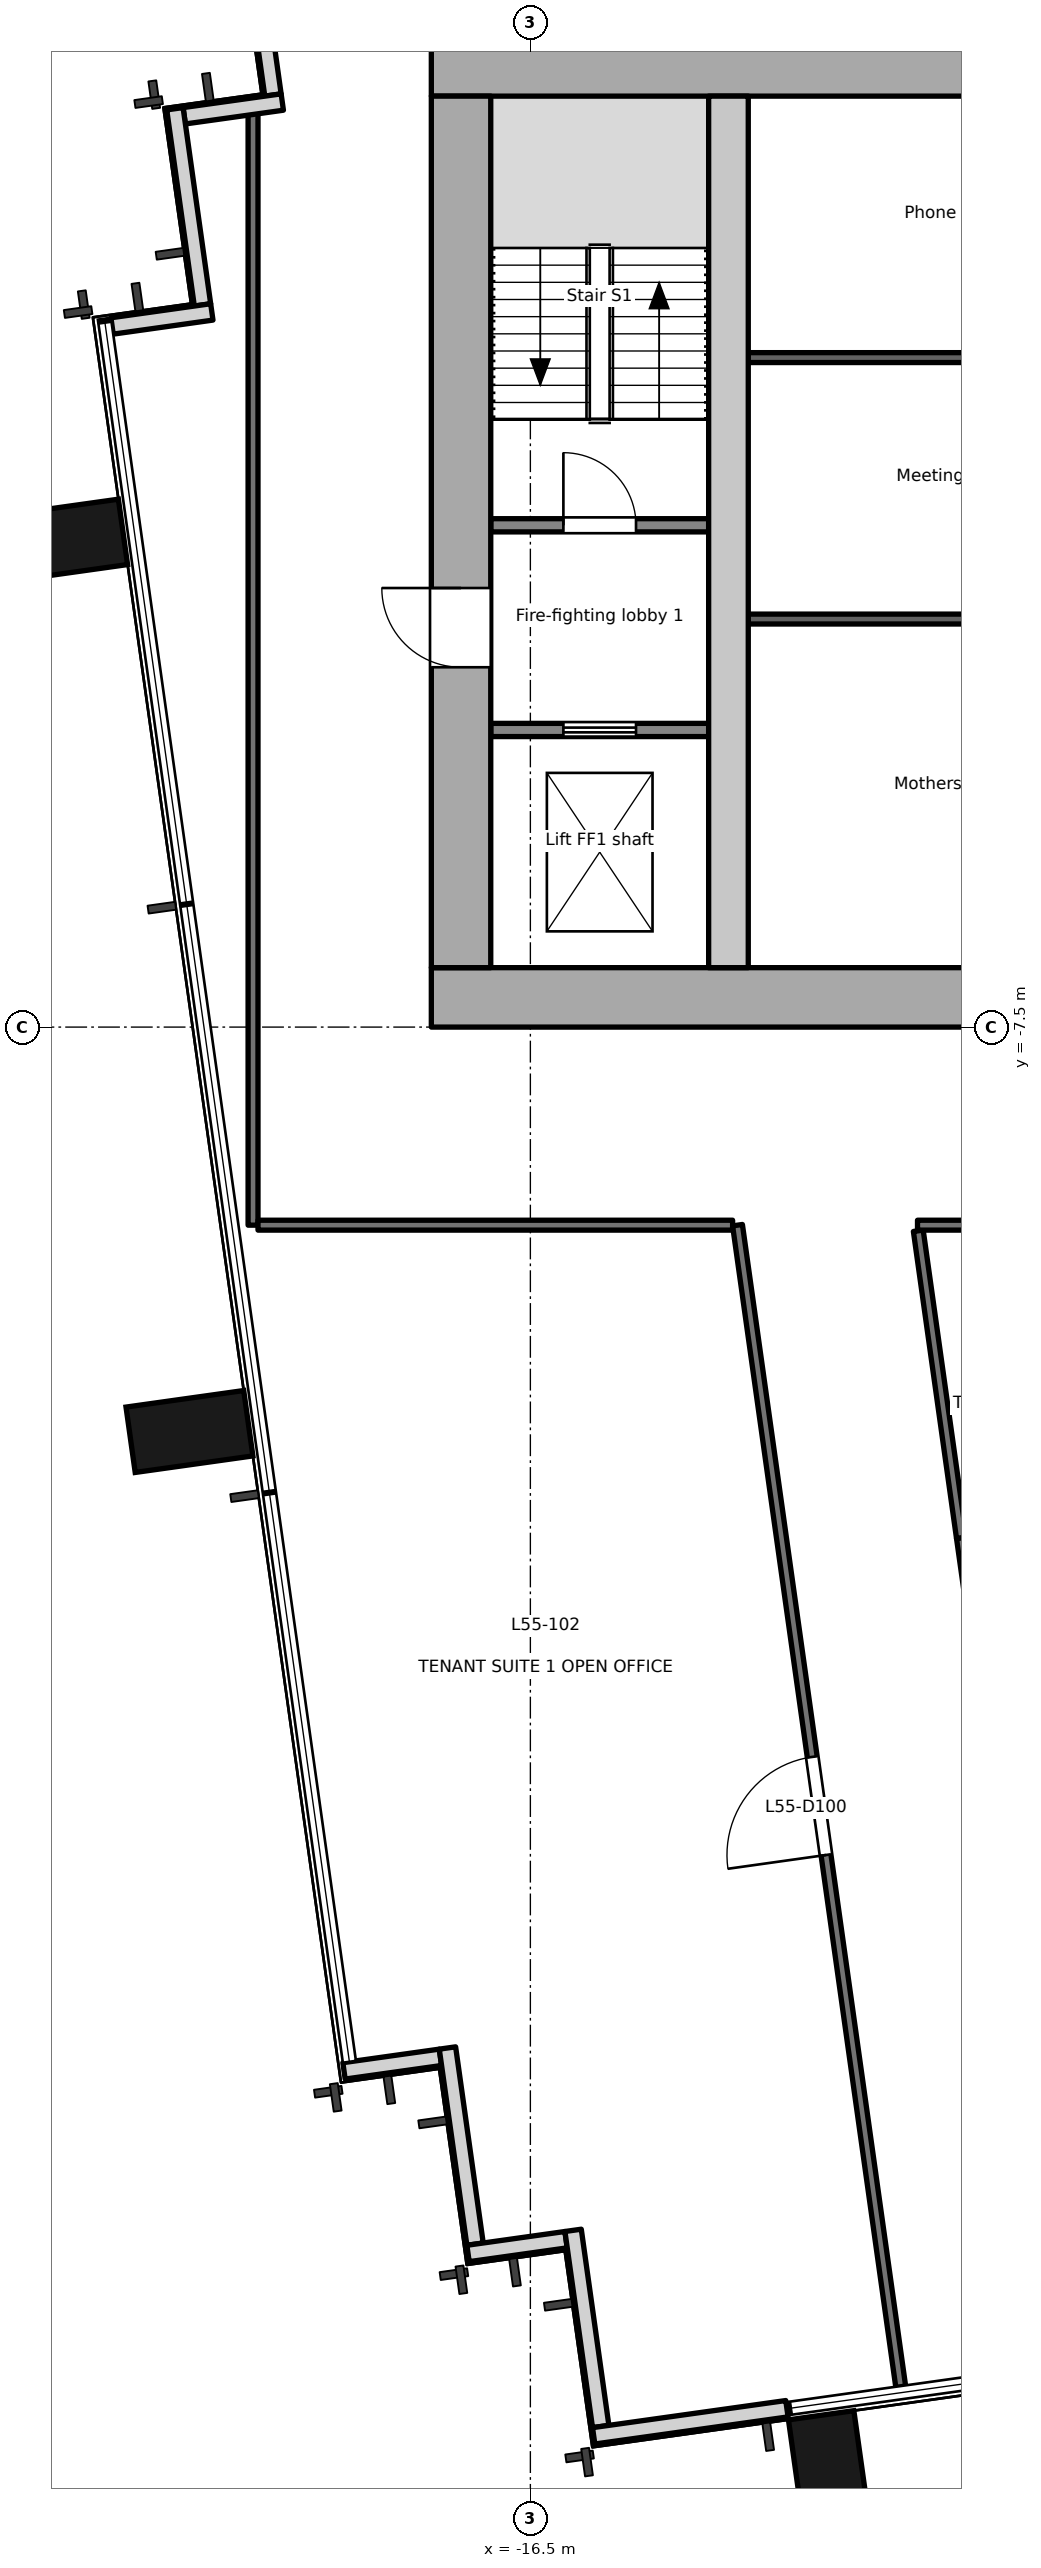
"""IFC4 building model, lengths in metres.
Left out: names, types, materials, properties, quantities, classifications, styles, units other than length and angle.
Written with IfcOpenShell. Run it as: python <this file> out.ifc"""

import sys

from ifc_helpers import new_model, si_unit, direction, frame, frame_2d, origin, origin_2d, place, context, subcontext, project, spatial, rectangle, extrude, element, fill, save


model = new_model("IFC4")
c1 = context("Model", 3, precision=1e-05, world=origin(), true_north=direction((0.0, 1.0)))
c2 = subcontext(c1, "Body", "Model", "MODEL_VIEW")
j1 = project(units=[si_unit("LENGTHUNIT", "METRE"), si_unit("PLANEANGLEUNIT", "RADIAN")], contexts=[c1])
p1 = place(None, origin())
s1 = spatial("IfcSite", under=j1, at=p1, CompositionType="ELEMENT")
p2 = place(p1, origin())
s2 = spatial("IfcBuilding", under=s1, at=p2, CompositionType="ELEMENT")
p3 = place(p2, frame((0.0, 0.0, 240.8)))
s3 = spatial("IfcBuildingStorey", under=s2, at=p3, CompositionType="ELEMENT", Elevation=240.8)
for number, where, z_axis, x_axis in (
    (1, (-11.971, -29.416, -0.2), (0.0, 0.0, 1.0), (0.99, 0.139, 0.0)),
    (2, (-21.663, -13.625, -0.2), (0.0, 0.0, 1.0), (-0.139, 0.99, 0.0)),
    (3, (-23.561, -0.125, -0.2), (0.0, 0.0, 1.0), (-0.139, 0.99, 0.0)),
):
    element("IfcColumn", number, at=place(p3, frame(where, z_axis=z_axis, x_axis=x_axis)), inside=s3, PredefinedType="COLUMN", context=c2, shape_type="SweptSolid", body=[
        extrude(rectangle(XDim=1.0, YDim=1.8, at=origin_2d()), origin(), (0.0, 0.0, 1.0), 3.9),
    ])
p4 = place(p3, frame((-20.815, 9.588, 0.0), z_axis=(0.0, 0.0, 1.0), x_axis=(0.138983028379, -0.9902947631, 0.0)))
e4 = element("IfcWall", 4, at=p4, inside=s3, PredefinedType="SOLIDWALL", context=c2, shape_type="SweptSolid", body=[
    extrude(rectangle(XDim=3.0, YDim=0.25, at=frame_2d((1.5, 0.0))), origin(), (0.0, 0.0, 1.0), 3.7),
])
p5 = place(p3, frame((-20.257, 6.51, 0.0), z_axis=(0.0, 0.0, 1.0), x_axis=(-0.990330117064, -0.138730887823, 0.0)))
e5 = element("IfcWall", 5, at=p5, inside=s3, PredefinedType="SOLIDWALL", context=c2, shape_type="SweptSolid", body=[
    extrude(rectangle(XDim=1.499, YDim=0.25, at=frame_2d((0.75, 0.0))), origin(), (0.0, 0.0, 1.0), 3.7),
])
p6 = place(p3, frame((-21.883, 6.409, 0.0), z_axis=(0.0, 0.0, 1.0), x_axis=(0.139324658755, -0.990246756855, 0.0)))
e6 = element("IfcWall", 6, at=p6, inside=s3, PredefinedType="SOLIDWALL", context=c2, shape_type="SweptSolid", body=[
    extrude(rectangle(XDim=3.0, YDim=0.25, at=frame_2d((1.5, 0.0))), origin(), (0.0, 0.0, 1.0), 3.7),
])
p7 = place(p3, frame((-21.324, 3.332, 0.0), z_axis=(0.0, 0.0, 1.0), x_axis=(-0.990238641016, -0.139382329723, 0.0)))
e7 = element("IfcWall", 7, at=p7, inside=s3, PredefinedType="SOLIDWALL", context=c2, shape_type="SweptSolid", body=[
    extrude(rectangle(XDim=1.526, YDim=0.25, at=frame_2d((0.763, 0.0))), origin(), (0.0, 0.0, 1.0), 3.7),
])
p8 = place(p3, frame((-19.322, -23.309, 0.0), z_axis=(0.0, 0.0, 1.0), x_axis=(0.990235520307, 0.13940449893, 0.0)))
e8 = element("IfcWall", 8, at=p8, inside=s3, PredefinedType="SOLIDWALL", context=c2, shape_type="SweptSolid", body=[
    extrude(rectangle(XDim=1.475, YDim=0.25, at=frame_2d((0.737, 0.0))), origin(), (0.0, 0.0, 1.0), 3.7),
])
p9 = place(p3, frame((-17.756, -22.962, 0.0), z_axis=(0.0, 0.0, 1.0), x_axis=(0.139393225799, -0.990237107263, 0.0)))
e9 = element("IfcWall", 9, at=p9, inside=s3, PredefinedType="SOLIDWALL", context=c2, shape_type="SweptSolid", body=[
    extrude(rectangle(XDim=3.0, YDim=0.25, at=frame_2d((1.5, 0.0))), origin(), (0.0, 0.0, 1.0), 3.7),
])
p10 = place(p3, frame((-17.444, -26.074, 0.0), z_axis=(0.0, 0.0, 1.0), x_axis=(0.990240434918, 0.139369584395, 0.0)))
e10 = element("IfcWall", 10, at=p10, inside=s3, PredefinedType="SOLIDWALL", context=c2, shape_type="SweptSolid", body=[
    extrude(rectangle(XDim=1.5, YDim=0.25, at=frame_2d((0.75, 0.0))), origin(), (0.0, 0.0, 1.0), 3.7),
])
p11 = place(p3, frame((-15.853, -25.724, 0.0), z_axis=(0.0, 0.0, 1.0), x_axis=(0.139302206688, -0.990249915532, 0.0)))
e11 = element("IfcWall", 11, at=p11, inside=s3, PredefinedType="SOLIDWALL", context=c2, shape_type="SweptSolid", body=[
    extrude(rectangle(XDim=3.0, YDim=0.25, at=frame_2d((1.5, 0.0))), origin(), (0.0, 0.0, 1.0), 3.7),
])
p12 = place(p3, frame((-15.541, -28.836, 0.0), z_axis=(0.0, 0.0, 1.0), x_axis=(0.990285396533, 0.139049751574, 0.0)))
e12 = element("IfcWall", 12, at=p12, inside=s3, PredefinedType="SOLIDWALL", context=c2, shape_type="SweptSolid", body=[
    extrude(rectangle(XDim=2.955, YDim=0.25, at=frame_2d((1.478, 0.0))), origin(), (0.0, 0.0, 1.0), 3.7),
])
p13 = place(p3, frame((-18.0, -7.05, -0.2), z_axis=(0.0, 0.0, 1.0), x_axis=(1.0, 0.0, 0.0)))
e13 = element("IfcWall", 13, at=p13, inside=s3, PredefinedType="SHEAR", context=c2, shape_type="SweptSolid", body=[
    extrude(rectangle(XDim=36.0, YDim=0.9, at=frame_2d((18.0, 0.0))), origin(), (0.0, 0.0, 1.0), 3.9),
])
p14 = place(p13, frame((11.3, 0.0, 0.2)))
e14 = element("IfcOpeningElement", 14, at=p14, cuts=e13, PredefinedType="OPENING", context=c2, shape_type="SweptSolid", body=[
    extrude(rectangle(XDim=1.8, YDim=2.1, at=frame_2d((0.9, 1.05))), frame((0.0, 0.46, 0.0), z_axis=(0.0, -1.0, 0.0), x_axis=(1.0, 0.0, 0.0)), (0.0, 0.0, 1.0), 0.921),
])
p15 = place(p13, frame((16.8, 0.0, 0.2)))
e15 = element("IfcOpeningElement", 15, at=p15, cuts=e13, PredefinedType="OPENING", context=c2, shape_type="SweptSolid", body=[
    extrude(rectangle(XDim=2.4, YDim=2.1, at=frame_2d((1.2, 1.05))), frame((0.0, 0.46, 0.0), z_axis=(0.0, -1.0, 0.0), x_axis=(1.0, 0.0, 0.0)), (0.0, 0.0, 1.0), 0.921),
])
p16 = place(p13, frame((26.1, 0.0, 0.2)))
e16 = element("IfcOpeningElement", 16, at=p16, cuts=e13, PredefinedType="OPENING", context=c2, shape_type="SweptSolid", body=[
    extrude(rectangle(XDim=2.4, YDim=2.1, at=frame_2d((1.2, 1.05))), frame((0.0, 0.46, 0.0), z_axis=(0.0, -1.0, 0.0), x_axis=(1.0, 0.0, 0.0)), (0.0, 0.0, 1.0), 0.921),
])
p17 = place(p3, frame((-18.0, 7.05, -0.2), z_axis=(0.0, 0.0, 1.0), x_axis=(1.0, 0.0, 0.0)))
e17 = element("IfcWall", 17, at=p17, inside=s3, PredefinedType="SHEAR", context=c2, shape_type="SweptSolid", body=[
    extrude(rectangle(XDim=36.0, YDim=0.9, at=frame_2d((18.0, 0.0))), origin(), (0.0, 0.0, 1.0), 3.9),
])
p18 = place(p3, frame((-17.55, -6.6, -0.2), z_axis=(0.0, 0.0, 1.0), x_axis=(0.0, 1.0, 0.0)))
e18 = element("IfcWall", 18, at=p18, inside=s3, PredefinedType="SHEAR", context=c2, shape_type="SweptSolid", body=[
    extrude(rectangle(XDim=13.2, YDim=0.9, at=frame_2d((6.6, 0.0))), origin(), (0.0, 0.0, 1.0), 3.9),
])
p19 = place(p18, frame((4.55, 0.0, 0.2)))
e19 = element("IfcOpeningElement", 19, at=p19, cuts=e18, PredefinedType="OPENING", context=c2, shape_type="SweptSolid", body=[
    extrude(rectangle(XDim=1.2, YDim=2.1, at=frame_2d((0.6, 1.05))), frame((0.0, 0.46, 0.0), z_axis=(0.0, -1.0, 0.0), x_axis=(1.0, 0.0, 0.0)), (0.0, 0.0, 1.0), 0.921),
])
p20 = place(p3, frame((-13.5, -6.6, -0.2), z_axis=(0.0, 0.0, 1.0), x_axis=(0.0, 1.0, 0.0)))
e20 = element("IfcWall", 20, at=p20, inside=s3, PredefinedType="SHEAR", context=c2, shape_type="SweptSolid", body=[
    extrude(rectangle(XDim=13.2, YDim=0.6, at=frame_2d((6.6, 0.0))), origin(), (0.0, 0.0, 1.0), 3.9),
])
p21 = place(p3, frame((-17.1, -3.0, 0.0), z_axis=(0.0, 0.0, 1.0), x_axis=(1.0, 0.0, 0.0)))
e21 = element("IfcWall", 21, at=p21, inside=s3, PredefinedType="PARTITIONING", context=c2, shape_type="SweptSolid", body=[
    extrude(rectangle(XDim=3.3, YDim=0.2, at=frame_2d((1.65, 0.0))), origin(), (0.0, 0.0, 1.0), 3.7),
])
p22 = place(p21, frame((1.1, 0.0, 0.0)))
e22 = element("IfcOpeningElement", 22, at=p22, cuts=e21, PredefinedType="OPENING", context=c2, shape_type="SweptSolid", body=[
    extrude(rectangle(XDim=1.1, YDim=2.1, at=frame_2d((0.55, 1.05))), frame((0.0, 0.111, 0.0), z_axis=(0.0, -1.0, 0.0), x_axis=(1.0, 0.0, 0.0)), (0.0, 0.0, 1.0), 0.221),
])
p23 = place(p3, frame((-17.1, 0.1, 0.0), z_axis=(0.0, 0.0, 1.0), x_axis=(1.0, 0.0, 0.0)))
e23 = element("IfcWall", 23, at=p23, inside=s3, PredefinedType="PARTITIONING", context=c2, shape_type="SweptSolid", body=[
    extrude(rectangle(XDim=3.3, YDim=0.2, at=frame_2d((1.65, 0.0))), origin(), (0.0, 0.0, 1.0), 3.7),
])
p24 = place(p23, frame((1.1, 0.0, 0.0)))
e24 = element("IfcOpeningElement", 24, at=p24, cuts=e23, PredefinedType="OPENING", context=c2, shape_type="SweptSolid", body=[
    extrude(rectangle(XDim=1.1, YDim=2.1, at=frame_2d((0.55, 1.05))), frame((0.0, 0.111, 0.0), z_axis=(0.0, -1.0, 0.0), x_axis=(1.0, 0.0, 0.0)), (0.0, 0.0, 1.0), 0.221),
])
for number, where, z_axis, x_axis in (
    (25, (-13.2, -1.32, 0.0), (0.0, 0.0, 1.0), (1.0, 0.0, 0.0)),
    (26, (-13.2, 2.64, 0.0), (0.0, 0.0, 1.0), (1.0, 0.0, 0.0)),
):
    element("IfcWall", number, at=place(p3, frame(where, z_axis=z_axis, x_axis=x_axis)), inside=s3, PredefinedType="PARTITIONING", context=c2, shape_type="SweptSolid", body=[
        extrude(rectangle(XDim=6.25, YDim=0.15, at=frame_2d((3.125, 0.0))), origin(), (0.0, 0.0, 1.0), 3.7),
    ])
p25 = place(p3, frame((-20.7, -10.5, 0.0), z_axis=(0.0, 0.0, 1.0), x_axis=(0.0, 1.0, 0.0)))
e27 = element("IfcWall", 27, at=p25, inside=s3, PredefinedType="PARTITIONING", context=c2, shape_type="SweptSolid", body=[
    extrude(rectangle(XDim=16.856, YDim=0.15, at=frame_2d((8.428, 0.0))), origin(), (0.0, 0.0, 1.0), 3.4),
])
p26 = place(p3, frame((-13.437, -10.5, 0.0), z_axis=(0.0, 0.0, 1.0), x_axis=(-1.0, 0.0, 0.0)))
e28 = element("IfcWall", 28, at=p26, inside=s3, PredefinedType="PARTITIONING", context=c2, shape_type="SweptSolid", body=[
    extrude(rectangle(XDim=7.188, YDim=0.15, at=frame_2d((3.594, 0.0))), origin(), (0.0, 0.0, 1.0), 3.7),
])
p27 = place(p3, frame((-10.891, -28.093, 0.0), z_axis=(0.0, 0.0, 1.0), x_axis=(-0.139139234553, 0.990272827764, 0.0)))
e29 = element("IfcWall", 29, at=p27, inside=s3, PredefinedType="PARTITIONING", context=c2, shape_type="SweptSolid", body=[
    extrude(rectangle(XDim=17.766, YDim=0.15, at=frame_2d((8.883, 0.0))), origin(), (0.0, 0.0, 1.0), 3.7),
])
p28 = place(p27, frame((8.133, 0.0, 0.0)))
e30 = element("IfcOpeningElement", 30, at=p28, cuts=e29, PredefinedType="OPENING", context=c2, shape_type="SweptSolid", body=[
    extrude(rectangle(XDim=1.5, YDim=2.1, at=frame_2d((0.75, 1.05))), frame((0.0, 0.085, 0.0), z_axis=(0.0, -1.0, 0.0), x_axis=(1.0, 0.0, 0.0)), (0.0, 0.0, 1.0), 0.171),
])
p29 = place(p3, frame((-9.972, -15.233, 0.0), z_axis=(0.0, 0.0, 1.0), x_axis=(0.139200531242, -0.990264213279, 0.0)))
e31 = element("IfcWall", 31, at=p29, inside=s3, PredefinedType="PARTITIONING", context=c2, shape_type="SweptSolid", body=[
    extrude(rectangle(XDim=12.607, YDim=0.15, at=frame_2d((6.303, 0.0))), origin(), (0.0, 0.0, 1.0), 2.8),
])
p30 = place(p29, frame((2.901, 0.0, 0.0)))
e32 = element("IfcOpeningElement", 32, at=p30, cuts=e31, PredefinedType="OPENING", context=c2, shape_type="SweptSolid", body=[
    extrude(rectangle(XDim=1.5, YDim=2.1, at=frame_2d((0.75, 1.05))), frame((0.0, 0.085, 0.0), z_axis=(0.0, -1.0, 0.0), x_axis=(1.0, 0.0, 0.0)), (0.0, 0.0, 1.0), 0.171),
])
p31 = place(p3, frame((-10.625, -10.585, 0.0), z_axis=(0.0, 0.0, 1.0), x_axis=(0.139112996275, -0.990276514044, 0.0)))
e33 = element("IfcWall", 33, at=p31, inside=s3, PredefinedType="PARTITIONING", context=c2, shape_type="SweptSolid", body=[
    extrude(rectangle(XDim=4.695, YDim=0.15, at=frame_2d((2.347, 0.0))), origin(), (0.0, 0.0, 1.0), 3.7),
])
p32 = place(p3, frame((-4.557, -10.5, 0.0), z_axis=(0.0, 0.0, 1.0), x_axis=(-1.0, 0.0, 0.0)))
e34 = element("IfcWall", 34, at=p32, inside=s3, PredefinedType="PARTITIONING", context=c2, shape_type="SweptSolid", body=[
    extrude(rectangle(XDim=6.08, YDim=0.15, at=frame_2d((3.04, 0.0))), origin(), (0.0, 0.0, 1.0), 2.8),
])
p33 = place(p22, origin())
e35 = element("IfcDoor", 35, at=p33, inside=s3, OperationType="DOUBLE_DOOR_SLIDING", PredefinedType="DOOR", context=c2, shape_type="SweptSolid", body=[
    extrude(rectangle(XDim=1.1, YDim=2.1, at=frame_2d((0.55, 1.05))), frame((0.0, 0.025, 0.0), z_axis=(0.0, -1.0, 0.0), x_axis=(1.0, 0.0, 0.0)), (0.0, 0.0, 1.0), 0.05),
])
fill(e22, e35)
p34 = place(p19, origin())
e36 = element("IfcDoor", 36, at=p34, inside=s3, OperationType="SINGLE_SWING_RIGHT", PredefinedType="DOOR", context=c2, shape_type="SweptSolid", body=[
    extrude(rectangle(XDim=1.2, YDim=2.1, at=frame_2d((0.6, 1.05))), frame((0.0, 0.025, 0.0), z_axis=(0.0, -1.0, 0.0), x_axis=(1.0, 0.0, 0.0)), (0.0, 0.0, 1.0), 0.05),
])
fill(e19, e36)
p35 = place(p24, origin())
e37 = element("IfcDoor", 37, at=p35, inside=s3, OperationType="SINGLE_SWING_LEFT", PredefinedType="DOOR", context=c2, shape_type="SweptSolid", body=[
    extrude(rectangle(XDim=1.1, YDim=2.1, at=frame_2d((0.55, 1.05))), frame((0.0, 0.025, 0.0), z_axis=(0.0, -1.0, 0.0), x_axis=(1.0, 0.0, 0.0)), (0.0, 0.0, 1.0), 0.05),
])
fill(e24, e37)
p36 = place(p28, origin())
e38 = element("IfcDoor", 38, at=p36, inside=s3, OperationType="DOUBLE_DOOR_SINGLE_SWING", PredefinedType="DOOR", context=c2, shape_type="SweptSolid", body=[
    extrude(rectangle(XDim=1.5, YDim=2.1, at=frame_2d((0.75, 1.05))), frame((0.0, 0.025, 0.0), z_axis=(0.0, -1.0, 0.0), x_axis=(1.0, 0.0, 0.0)), (0.0, 0.0, 1.0), 0.05),
])
fill(e30, e38)
save(model, sys.argv[1])
